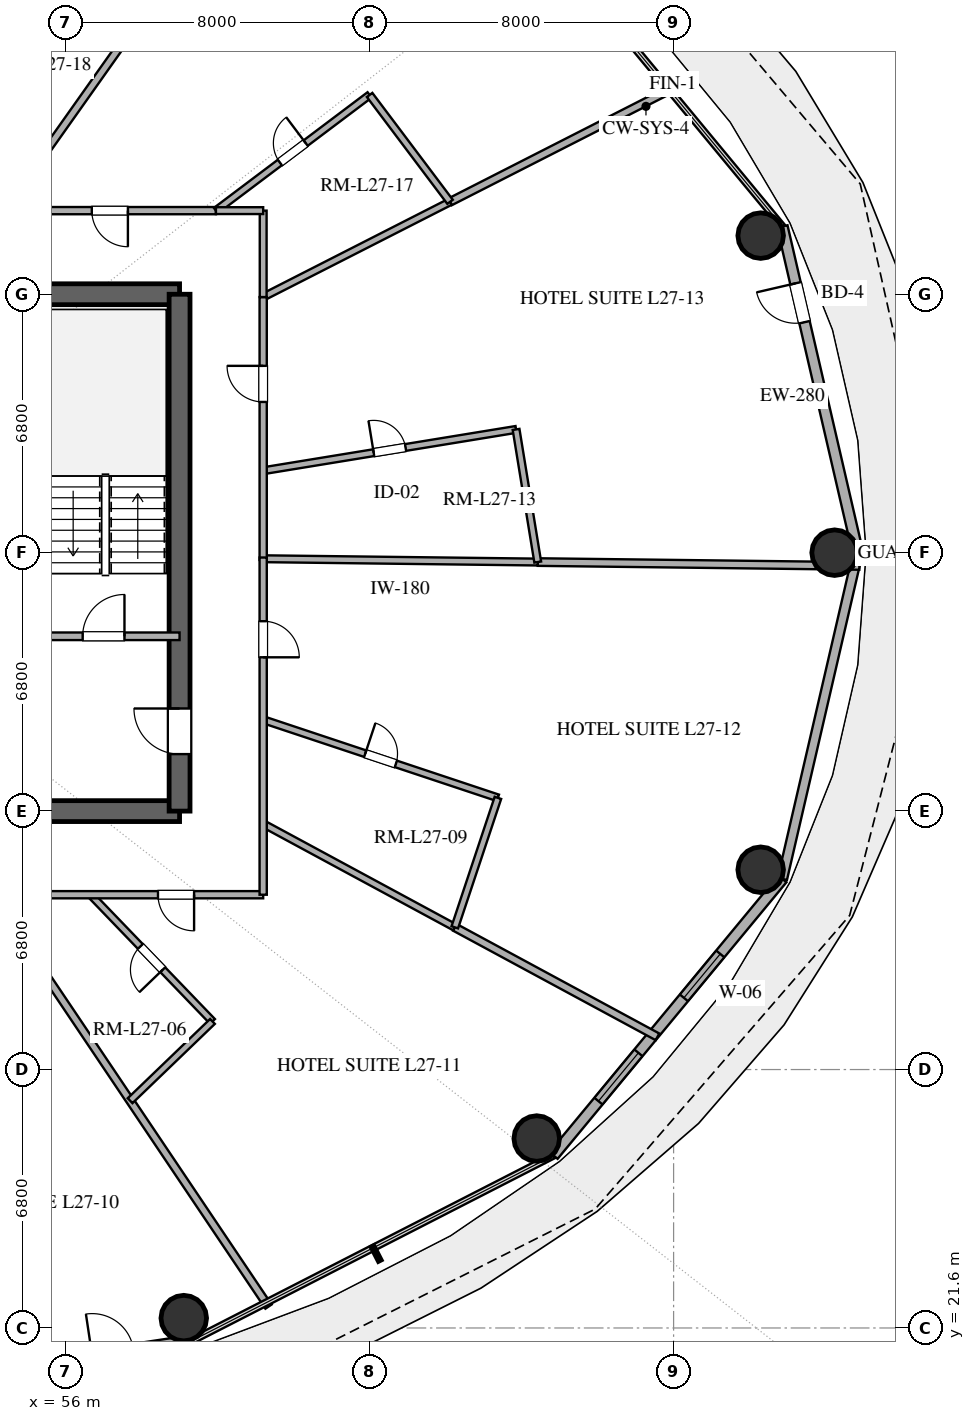
"""IFC4 building model, lengths in metres.
Left out: names, types, materials, properties, quantities, classifications, styles, units other than length and angle.
Written with IfcOpenShell. Run it as: python <this file> out.ifc"""

import sys

from ifc_helpers import new_model, si_unit, direction, frame, frame_2d, origin, origin_2d, place, context, subcontext, project, spatial, rectangle, hollow_circle, extrude, element, fill, save


model = new_model("IFC4")
c1 = context("Model", 3, precision=1e-05, world=origin(), true_north=direction((0.0, 1.0)))
c2 = subcontext(c1, "Body", "Model", "MODEL_VIEW")
j1 = project(units=[si_unit("LENGTHUNIT", "METRE"), si_unit("PLANEANGLEUNIT", "RADIAN")], contexts=[c1])
p1 = place(None, origin())
s1 = spatial("IfcSite", under=j1, at=p1, CompositionType="ELEMENT")
p2 = place(p1, origin())
s2 = spatial("IfcBuilding", under=s1, at=p2, CompositionType="ELEMENT")
p3 = place(p2, frame((0.0, 0.0, 109.2)))
s3 = spatial("IfcBuildingStorey", under=s2, at=p3, CompositionType="ELEMENT", Elevation=109.2)
for number, where, z_axis, x_axis in (
    (1, (55.0, 35.2, 0.0), (0.0, 0.0, 1.0), (1.0, 0.0, 0.0)),
    (2, (55.0, 48.8, 0.0), (0.0, 0.0, 1.0), (1.0, 0.0, 0.0)),
):
    element("IfcWall", number, at=place(p3, frame(where, z_axis=z_axis, x_axis=x_axis)), inside=s3, PredefinedType="SHEAR", context=c2, shape_type="SweptSolid", body=[
        extrude(rectangle(XDim=4.0, YDim=0.55, at=frame_2d((2.0, 0.0))), origin(), (0.0, 0.0, 1.0), 3.38),
    ])
p4 = place(p3, frame((59.0, 35.2, 0.0), z_axis=(0.0, 0.0, 1.0), x_axis=(0.0, 1.0, 0.0)))
e3 = element("IfcWall", 3, at=p4, inside=s3, PredefinedType="SHEAR", context=c2, shape_type="SweptSolid", body=[
    extrude(rectangle(XDim=13.6, YDim=0.55, at=frame_2d((6.8, 0.0))), origin(), (0.0, 0.0, 1.0), 3.38),
])
p5 = place(p4, frame((1.5, 0.0, 0.0)))
e4 = element("IfcOpeningElement", 4, at=p5, cuts=e3, PredefinedType="OPENING", context=c2, shape_type="SweptSolid", body=[
    extrude(rectangle(XDim=1.2, YDim=2.15, at=frame_2d((0.6, 1.075))), frame((0.0, 0.285, 0.0), z_axis=(0.0, -1.0, 0.0), x_axis=(1.0, 0.0, 0.0)), (0.0, 0.0, 1.0), 0.57),
])
for number, where, z_axis, x_axis in (
    (5, (76.237, 42.0, 0.0), (0.0, 0.0, 1.0), (1.0, 0.0, 0.0)),
    (6, (74.291, 50.343, 0.0), (0.0, 0.0, 1.0), (1.0, 0.0, 0.0)),
    (7, (59.11, 21.859, 0.0), (0.0, 0.0, 1.0), (1.0, 0.0, 0.0)),
    (8, (68.398, 26.585, 0.0), (0.0, 0.0, 1.0), (1.0, 0.0, 0.0)),
    (9, (74.291, 33.657, 0.0), (0.0, 0.0, 1.0), (1.0, 0.0, 0.0)),
):
    element("IfcColumn", number, at=place(p3, frame(where, z_axis=z_axis, x_axis=x_axis)), inside=s3, PredefinedType="COLUMN", context=c2, shape_type="SweptSolid", body=[
        extrude(hollow_circle(Radius=0.6, WallThickness=0.032, at=origin_2d()), origin(), (0.0, 0.0, 1.0), 3.38),
    ])
p6 = place(p3, frame((76.849, 42.0, 0.0), z_axis=(0.0, 0.0, 1.0), x_axis=(-0.22558597182, 0.974223264616, 0.0)))
e10 = element("IfcWall", 10, at=p6, inside=s3, PredefinedType="SOLIDWALL", context=c2, shape_type="SweptSolid", body=[
    extrude(rectangle(XDim=8.811, YDim=0.28, at=frame_2d((4.405, 0.0))), origin(), (0.0, 0.0, 1.0), 3.38),
])
p7 = place(p6, frame((6.225, 0.0, 0.0)))
e11 = element("IfcOpeningElement", 11, at=p7, cuts=e10, PredefinedType="OPENING", context=c2, shape_type="SweptSolid", body=[
    extrude(rectangle(XDim=1.05, YDim=2.2, at=frame_2d((0.525, 1.1))), frame((0.0, 0.15, 0.0), z_axis=(0.0, -1.0, 0.0), x_axis=(1.0, 0.0, 0.0)), (0.0, 0.0, 1.0), 0.3),
])
p8 = place(p3, frame((48.0, 19.57, 0.0), z_axis=(0.0, 0.0, 1.0), x_axis=(0.988877774656, 0.148730450117, 0.0)))
e12 = element("IfcWall", 12, at=p8, inside=s3, PredefinedType="SOLIDWALL", context=c2, shape_type="SweptSolid", body=[
    extrude(rectangle(XDim=11.479, YDim=0.28, at=frame_2d((5.74, 0.0))), origin(), (0.0, 0.0, 1.0), 3.38),
])
p9 = place(p8, frame((8.797, 0.0, 0.0)))
e13 = element("IfcOpeningElement", 13, at=p9, cuts=e12, PredefinedType="OPENING", context=c2, shape_type="SweptSolid", body=[
    extrude(rectangle(XDim=1.1, YDim=2.25, at=frame_2d((0.55, 1.125))), frame((0.0, 0.15, 0.0), z_axis=(0.0, -1.0, 0.0), x_axis=(1.0, 0.0, 0.0)), (0.0, 0.0, 1.0), 0.3),
])
p10 = place(p3, frame((68.84, 26.14, 0.0), z_axis=(0.0, 0.0, 1.0), x_axis=(0.637505817448, 0.770445541696, 0.0)))
e14 = element("IfcWall", 14, at=p10, inside=s3, PredefinedType="SOLIDWALL", context=c2, shape_type="SweptSolid", body=[
    extrude(rectangle(XDim=9.445, YDim=0.28, at=frame_2d((4.723, 0.0))), origin(), (0.0, 0.0, 1.0), 3.38),
])
p11 = place(p10, frame((1.855, 0.0, 0.85)))
e15 = element("IfcOpeningElement", 15, at=p11, cuts=e14, PredefinedType="OPENING", context=c2, shape_type="SweptSolid", body=[
    extrude(rectangle(XDim=1.65, YDim=2.0, at=frame_2d((0.825, 1.0))), frame((0.0, 0.15, 0.0), z_axis=(0.0, -1.0, 0.0), x_axis=(1.0, 0.0, 0.0)), (0.0, 0.0, 1.0), 0.3),
])
p12 = place(p10, frame((5.383, 0.0, 0.85)))
e16 = element("IfcOpeningElement", 16, at=p12, cuts=e14, PredefinedType="OPENING", context=c2, shape_type="SweptSolid", body=[
    extrude(rectangle(XDim=1.5, YDim=2.0, at=frame_2d((0.75, 1.0))), frame((0.0, 0.15, 0.0), z_axis=(0.0, -1.0, 0.0), x_axis=(1.0, 0.0, 0.0)), (0.0, 0.0, 1.0), 0.3),
])
p13 = place(p3, frame((74.861, 33.417, 0.0), z_axis=(0.0, 0.0, 1.0), x_axis=(0.22558597182, 0.974223264616, 0.0)))
e17 = element("IfcWall", 17, at=p13, inside=s3, PredefinedType="SOLIDWALL", context=c2, shape_type="SweptSolid", body=[
    extrude(rectangle(XDim=8.811, YDim=0.25, at=frame_2d((4.405, 0.0))), origin(), (0.0, 0.0, 1.0), 3.38),
])
p14 = place(p3, frame((55.0, 39.8, 0.0), z_axis=(0.0, 0.0, 1.0), x_axis=(1.0, 0.0, 0.0)))
e18 = element("IfcWall", 18, at=p14, inside=s3, PredefinedType="SOLIDWALL", context=c2, shape_type="SweptSolid", body=[
    extrude(rectangle(XDim=4.0, YDim=0.2, at=frame_2d((2.0, 0.0))), origin(), (0.0, 0.0, 1.0), 2.74),
])
p15 = place(p14, frame((1.45, 0.0, 0.0)))
e19 = element("IfcOpeningElement", 19, at=p15, cuts=e18, PredefinedType="OPENING", context=c2, shape_type="SweptSolid", body=[
    extrude(rectangle(XDim=1.1, YDim=2.15, at=frame_2d((0.55, 1.075))), frame((0.0, 0.11, 0.0), z_axis=(0.0, -1.0, 0.0), x_axis=(1.0, 0.0, 0.0)), (0.0, 0.0, 1.0), 0.22),
])
p16 = place(p3, frame((76.888, 41.651, 0.0), z_axis=(0.0, 0.0, 1.0), x_axis=(-0.9999269672, 0.012085539541, 0.0)))
e20 = element("IfcWall", 20, at=p16, inside=s3, PredefinedType="PARTITIONING", context=c2, shape_type="SweptSolid", body=[
    extrude(rectangle(XDim=8.464, YDim=0.2, at=frame_2d((4.232, 0.0))), origin(), (0.0, 0.0, 1.0), 2.74),
])
p17 = place(p3, frame((54.374, 51.0, 0.0), z_axis=(0.0, 0.0, 1.0), x_axis=(0.577967135411, 0.816060040919, 0.0)))
e21 = element("IfcWall", 21, at=p17, inside=s3, PredefinedType="PARTITIONING", context=c2, shape_type="SweptSolid", body=[
    extrude(rectangle(XDim=12.953, YDim=0.2, at=frame_2d((6.477, 0.0))), origin(), (0.0, 0.0, 1.0), 2.74),
])
p18 = place(p3, frame((68.425, 41.753, 0.0), z_axis=(0.0, 0.0, 1.0), x_axis=(-0.999926833816, 0.012096570355, 0.0)))
e22 = element("IfcWall", 22, at=p18, inside=s3, PredefinedType="PLUMBINGWALL", context=c2, shape_type="SweptSolid", body=[
    extrude(rectangle(XDim=7.225, YDim=0.18, at=frame_2d((3.613, 0.0))), origin(), (0.0, 0.0, 1.0), 2.74),
])
p19 = place(p3, frame((61.2, 44.156, 0.0), z_axis=(0.0, 0.0, 1.0), x_axis=(0.986917247844, 0.161227621419, 0.0)))
e23 = element("IfcWall", 23, at=p19, inside=s3, PredefinedType="PLUMBINGWALL", context=c2, shape_type="SweptSolid", body=[
    extrude(rectangle(XDim=6.743, YDim=0.18, at=frame_2d((3.372, 0.0))), origin(), (0.0, 0.0, 1.0), 2.74),
])
p20 = place(p19, frame((2.946, 0.0, 0.0)))
e24 = element("IfcOpeningElement", 24, at=p20, cuts=e23, PredefinedType="OPENING", context=c2, shape_type="SweptSolid", body=[
    extrude(rectangle(XDim=0.85, YDim=2.1, at=frame_2d((0.425, 1.05))), frame((0.0, 0.1, 0.0), z_axis=(0.0, -1.0, 0.0), x_axis=(1.0, 0.0, 0.0)), (0.0, 0.0, 1.0), 0.2),
])
p21 = place(p3, frame((71.998, 54.228, 0.0), z_axis=(0.0, 0.0, 1.0), x_axis=(-0.891005333778, -0.453992836044, 0.0)))
e25 = element("IfcWall", 25, at=p21, inside=s3, PredefinedType="PARTITIONING", context=c2, shape_type="SweptSolid", body=[
    extrude(rectangle(XDim=6.599, YDim=0.2, at=frame_2d((3.3, 0.0))), origin(), (0.0, 0.0, 1.0), 2.74),
])
p22 = place(p3, frame((54.053, 33.0, 0.0), z_axis=(0.0, 0.0, 1.0), x_axis=(0.558073496329, -0.829791523634, 0.0)))
e26 = element("IfcWall", 26, at=p22, inside=s3, PredefinedType="PARTITIONING", context=c2, shape_type="SweptSolid", body=[
    extrude(rectangle(XDim=13.06, YDim=0.2, at=frame_2d((6.53, 0.0))), origin(), (0.0, 0.0, 1.0), 2.74),
])
p23 = place(p3, frame((61.2, 37.605, 0.0), z_axis=(0.0, 0.0, 1.0), x_axis=(0.948788249983, -0.315912735884, 0.0)))
e27 = element("IfcWall", 27, at=p23, inside=s3, PredefinedType="PLUMBINGWALL", context=c2, shape_type="SweptSolid", body=[
    extrude(rectangle(XDim=6.51, YDim=0.18, at=frame_2d((3.255, 0.0))), origin(), (0.0, 0.0, 1.0), 2.74),
])
p24 = place(p23, frame((2.83, 0.0, 0.0)))
e28 = element("IfcOpeningElement", 28, at=p24, cuts=e27, PredefinedType="OPENING", context=c2, shape_type="SweptSolid", body=[
    extrude(rectangle(XDim=0.85, YDim=2.1, at=frame_2d((0.425, 1.05))), frame((0.0, 0.1, 0.0), z_axis=(0.0, -1.0, 0.0), x_axis=(1.0, 0.0, 0.0)), (0.0, 0.0, 1.0), 0.2),
])
p25 = place(p3, frame((71.576, 29.261, 0.0), z_axis=(0.0, 0.0, 1.0), x_axis=(-0.879774354245, 0.475391507721, 0.0)))
e29 = element("IfcWall", 29, at=p25, inside=s3, PredefinedType="PARTITIONING", context=c2, shape_type="SweptSolid", body=[
    extrude(rectangle(XDim=6.062, YDim=0.2, at=frame_2d((3.031, 0.0))), origin(), (0.0, 0.0, 1.0), 2.74),
])
p26 = place(p3, frame((66.243, 32.143, 0.0), z_axis=(0.0, 0.0, 1.0), x_axis=(-0.879784992633, 0.475371819461, 0.0)))
e30 = element("IfcWall", 30, at=p26, inside=s3, PredefinedType="PLUMBINGWALL", context=c2, shape_type="SweptSolid", body=[
    extrude(rectangle(XDim=5.732, YDim=0.18, at=frame_2d((2.866, 0.0))), origin(), (0.0, 0.0, 1.0), 2.74),
])
p27 = place(p3, frame((59.957, 51.0, 0.0), z_axis=(0.0, 0.0, 1.0), x_axis=(-1.0, 0.0, 0.0)))
e31 = element("IfcWall", 31, at=p27, inside=s3, PredefinedType="PARTITIONING", context=c2, shape_type="SweptSolid", body=[
    extrude(rectangle(XDim=7.73, YDim=0.19, at=frame_2d((3.865, 0.0))), origin(), (0.0, 0.0, 1.0), 2.74),
])
p28 = place(p27, frame((2.316, 0.0, 0.0)))
e32 = element("IfcOpeningElement", 32, at=p28, cuts=e31, PredefinedType="OPENING", context=c2, shape_type="SweptSolid", body=[
    extrude(rectangle(XDim=0.95, YDim=2.15, at=frame_2d((0.475, 1.075))), frame((0.0, 0.105, 0.0), z_axis=(0.0, -1.0, 0.0), x_axis=(1.0, 0.0, 0.0)), (0.0, 0.0, 1.0), 0.21),
])
p29 = place(p3, frame((66.118, 51.231, 0.0), z_axis=(0.0, 0.0, 1.0), x_axis=(-0.891004388837, -0.453994690579, 0.0)))
e33 = element("IfcWall", 33, at=p29, inside=s3, PredefinedType="PLUMBINGWALL", context=c2, shape_type="SweptSolid", body=[
    extrude(rectangle(XDim=5.52, YDim=0.18, at=frame_2d((2.76, 0.0))), origin(), (0.0, 0.0, 1.0), 2.74),
])
p30 = place(p3, frame((59.957, 51.0, 0.0), z_axis=(0.0, 0.0, 1.0), x_axis=(0.798951197172, 0.601395863419, 0.0)))
e34 = element("IfcWall", 34, at=p30, inside=s3, PredefinedType="PLUMBINGWALL", context=c2, shape_type="SweptSolid", body=[
    extrude(rectangle(XDim=5.062, YDim=0.18, at=frame_2d((2.531, 0.0))), origin(), (0.0, 0.0, 1.0), 2.74),
])
p31 = place(p30, frame((2.106, 0.0, 0.0)))
e35 = element("IfcOpeningElement", 35, at=p31, cuts=e34, PredefinedType="OPENING", context=c2, shape_type="SweptSolid", body=[
    extrude(rectangle(XDim=0.85, YDim=2.1, at=frame_2d((0.425, 1.05))), frame((0.0, 0.1, 0.0), z_axis=(0.0, -1.0, 0.0), x_axis=(1.0, 0.0, 0.0)), (0.0, 0.0, 1.0), 0.2),
])
p32 = place(p3, frame((59.866, 29.666, 0.0), z_axis=(0.0, 0.0, 1.0), x_axis=(-0.693306956927, 0.720642396392, 0.0)))
e36 = element("IfcWall", 36, at=p32, inside=s3, PredefinedType="PLUMBINGWALL", context=c2, shape_type="SweptSolid", body=[
    extrude(rectangle(XDim=4.626, YDim=0.18, at=frame_2d((2.313, 0.0))), origin(), (0.0, 0.0, 1.0), 2.74),
])
p33 = place(p32, frame((1.888, 0.0, 0.0)))
e37 = element("IfcOpeningElement", 37, at=p33, cuts=e36, PredefinedType="OPENING", context=c2, shape_type="SweptSolid", body=[
    extrude(rectangle(XDim=0.85, YDim=2.1, at=frame_2d((0.425, 1.05))), frame((0.0, 0.1, 0.0), z_axis=(0.0, -1.0, 0.0), x_axis=(1.0, 0.0, 0.0)), (0.0, 0.0, 1.0), 0.2),
])
p34 = place(p3, frame((61.2, 33.0, 0.0), z_axis=(0.0, 0.0, 1.0), x_axis=(-1.0, 0.0, 0.0)))
e38 = element("IfcWall", 38, at=p34, inside=s3, PredefinedType="PARTITIONING", context=c2, shape_type="SweptSolid", body=[
    extrude(rectangle(XDim=7.186, YDim=0.19, at=frame_2d((3.593, 0.0))), origin(), (0.0, 0.0, 1.0), 2.74),
])
p35 = place(p34, frame((1.818, 0.0, 0.0)))
e39 = element("IfcOpeningElement", 39, at=p35, cuts=e38, PredefinedType="OPENING", context=c2, shape_type="SweptSolid", body=[
    extrude(rectangle(XDim=0.95, YDim=2.15, at=frame_2d((0.475, 1.075))), frame((0.0, 0.105, 0.0), z_axis=(0.0, -1.0, 0.0), x_axis=(1.0, 0.0, 0.0)), (0.0, 0.0, 1.0), 0.21),
])
p36 = place(p3, frame((61.2, 41.809, 0.0), z_axis=(0.0, 0.0, 1.0), x_axis=(0.0, 1.0, 0.0)))
e40 = element("IfcWall", 40, at=p36, inside=s3, PredefinedType="PARTITIONING", context=c2, shape_type="SweptSolid", body=[
    extrude(rectangle(XDim=6.917, YDim=0.19, at=frame_2d((3.458, 0.0))), origin(), (0.0, 0.0, 1.0), 2.74),
])
p37 = place(p36, frame((4.157, 0.0, 0.0)))
e41 = element("IfcOpeningElement", 41, at=p37, cuts=e40, PredefinedType="OPENING", context=c2, shape_type="SweptSolid", body=[
    extrude(rectangle(XDim=0.95, YDim=2.15, at=frame_2d((0.475, 1.075))), frame((0.0, 0.105, 0.0), z_axis=(0.0, -1.0, 0.0), x_axis=(1.0, 0.0, 0.0)), (0.0, 0.0, 1.0), 0.21),
])
p38 = place(p3, frame((61.2, 41.873, 0.0), z_axis=(0.0, 0.0, 1.0), x_axis=(0.0, -1.0, 0.0)))
e42 = element("IfcWall", 42, at=p38, inside=s3, PredefinedType="PARTITIONING", context=c2, shape_type="SweptSolid", body=[
    extrude(rectangle(XDim=8.873, YDim=0.19, at=frame_2d((4.436, 0.0))), origin(), (0.0, 0.0, 1.0), 2.74),
])
p39 = place(p38, frame((1.676, 0.0, 0.0)))
e43 = element("IfcOpeningElement", 43, at=p39, cuts=e42, PredefinedType="OPENING", context=c2, shape_type="SweptSolid", body=[
    extrude(rectangle(XDim=0.95, YDim=2.15, at=frame_2d((0.475, 1.075))), frame((0.0, 0.105, 0.0), z_axis=(0.0, -1.0, 0.0), x_axis=(1.0, 0.0, 0.0)), (0.0, 0.0, 1.0), 0.21),
])
p40 = place(p3, frame((67.377, 35.548, 0.0), z_axis=(0.0, 0.0, 1.0), x_axis=(-0.315860462711, -0.948805653491, 0.0)))
e44 = element("IfcWall", 44, at=p40, inside=s3, PredefinedType="PLUMBINGWALL", context=c2, shape_type="SweptSolid", body=[
    extrude(rectangle(XDim=3.59, YDim=0.18, at=frame_2d((1.795, 0.0))), origin(), (0.0, 0.0, 1.0), 2.74),
])
p41 = place(p3, frame((67.855, 45.243, 0.0), z_axis=(0.0, 0.0, 1.0), x_axis=(0.161207379819, -0.986920554397, 0.0)))
e45 = element("IfcWall", 45, at=p41, inside=s3, PredefinedType="PLUMBINGWALL", context=c2, shape_type="SweptSolid", body=[
    extrude(rectangle(XDim=3.536, YDim=0.18, at=frame_2d((1.768, 0.0))), origin(), (0.0, 0.0, 1.0), 2.74),
])
p42 = place(p3, frame((64.001, 54.044, 0.0), z_axis=(0.0, 0.0, 1.0), x_axis=(0.601341788725, -0.79899189804, 0.0)))
e46 = element("IfcWall", 46, at=p42, inside=s3, PredefinedType="PLUMBINGWALL", context=c2, shape_type="SweptSolid", body=[
    extrude(rectangle(XDim=3.52, YDim=0.18, at=frame_2d((1.76, 0.0))), origin(), (0.0, 0.0, 1.0), 2.74),
])
p43 = place(p3, frame((57.698, 27.58, 0.0), z_axis=(0.0, 0.0, 1.0), x_axis=(0.720688028056, 0.693259522991, 0.0)))
e47 = element("IfcWall", 47, at=p43, inside=s3, PredefinedType="PLUMBINGWALL", context=c2, shape_type="SweptSolid", body=[
    extrude(rectangle(XDim=3.009, YDim=0.18, at=frame_2d((1.504, 0.0))), origin(), (0.0, 0.0, 1.0), 2.74),
])
p44 = place(p3, frame((61.2, 48.726, 0.0), z_axis=(0.0, 0.0, 1.0), x_axis=(0.0, 1.0, 0.0)))
e48 = element("IfcWall", 48, at=p44, inside=s3, PredefinedType="PLUMBINGWALL", context=c2, shape_type="SweptSolid", body=[
    extrude(rectangle(XDim=2.274, YDim=0.18, at=frame_2d((1.137, 0.0))), origin(), (0.0, 0.0, 1.0), 2.74),
])
p45 = place(p3, frame((61.2, 51.0, 0.0), z_axis=(0.0, 0.0, 1.0), x_axis=(-1.0, 0.0, 0.0)))
e49 = element("IfcWall", 49, at=p45, inside=s3, PredefinedType="PLUMBINGWALL", context=c2, shape_type="SweptSolid", body=[
    extrude(rectangle(XDim=1.243, YDim=0.18, at=frame_2d((0.622, 0.0))), origin(), (0.0, 0.0, 1.0), 2.74),
])
p46 = place(p7, origin())
e50 = element("IfcDoor", 50, at=p46, inside=s3, OperationType="SINGLE_SWING_RIGHT", PredefinedType="DOOR", context=c2, shape_type="SweptSolid", body=[
    extrude(rectangle(XDim=1.05, YDim=2.2, at=frame_2d((0.525, 1.1))), frame((0.0, 0.025, 0.0), z_axis=(0.0, -1.0, 0.0), x_axis=(1.0, 0.0, 0.0)), (0.0, 0.0, 1.0), 0.05),
])
fill(e11, e50)
p47 = place(p11, origin())
e51 = element("IfcWindow", 51, at=p47, inside=s3, PartitioningType="SINGLE_PANEL", PredefinedType="WINDOW", context=c2, shape_type="SweptSolid", body=[
    extrude(rectangle(XDim=1.65, YDim=2.0, at=frame_2d((0.825, 1.0))), frame((0.0, 0.03, 0.0), z_axis=(0.0, -1.0, 0.0), x_axis=(1.0, 0.0, 0.0)), (0.0, 0.0, 1.0), 0.06),
])
fill(e15, e51)
p48 = place(p12, origin())
e52 = element("IfcWindow", 52, at=p48, inside=s3, PartitioningType="SINGLE_PANEL", PredefinedType="WINDOW", context=c2, shape_type="SweptSolid", body=[
    extrude(rectangle(XDim=1.5, YDim=2.0, at=frame_2d((0.75, 1.0))), frame((0.0, 0.03, 0.0), z_axis=(0.0, -1.0, 0.0), x_axis=(1.0, 0.0, 0.0)), (0.0, 0.0, 1.0), 0.06),
])
fill(e16, e52)
p49 = place(p5, origin())
e53 = element("IfcDoor", 53, at=p49, inside=s3, OperationType="SINGLE_SWING_RIGHT", PredefinedType="DOOR", context=c2, shape_type="SweptSolid", body=[
    extrude(rectangle(XDim=1.2, YDim=2.15, at=frame_2d((0.6, 1.075))), frame((0.0, 0.025, 0.0), z_axis=(0.0, -1.0, 0.0), x_axis=(1.0, 0.0, 0.0)), (0.0, 0.0, 1.0), 0.05),
])
fill(e4, e53)
p50 = place(p15, origin())
e54 = element("IfcDoor", 54, at=p50, inside=s3, OperationType="SINGLE_SWING_RIGHT", PredefinedType="DOOR", context=c2, shape_type="SweptSolid", body=[
    extrude(rectangle(XDim=1.1, YDim=2.15, at=frame_2d((0.55, 1.075))), frame((0.0, 0.025, 0.0), z_axis=(0.0, -1.0, 0.0), x_axis=(1.0, 0.0, 0.0)), (0.0, 0.0, 1.0), 0.05),
])
fill(e19, e54)
p51 = place(p20, origin())
e55 = element("IfcDoor", 55, at=p51, inside=s3, OperationType="SINGLE_SWING_LEFT", PredefinedType="DOOR", context=c2, shape_type="SweptSolid", body=[
    extrude(rectangle(XDim=0.85, YDim=2.1, at=frame_2d((0.425, 1.05))), frame((0.0, 0.025, 0.0), z_axis=(0.0, -1.0, 0.0), x_axis=(1.0, 0.0, 0.0)), (0.0, 0.0, 1.0), 0.05),
])
fill(e24, e55)
p52 = place(p24, origin())
e56 = element("IfcDoor", 56, at=p52, inside=s3, OperationType="SINGLE_SWING_LEFT", PredefinedType="DOOR", context=c2, shape_type="SweptSolid", body=[
    extrude(rectangle(XDim=0.85, YDim=2.1, at=frame_2d((0.425, 1.05))), frame((0.0, 0.025, 0.0), z_axis=(0.0, -1.0, 0.0), x_axis=(1.0, 0.0, 0.0)), (0.0, 0.0, 1.0), 0.05),
])
fill(e28, e56)
p53 = place(p28, origin())
e57 = element("IfcDoor", 57, at=p53, inside=s3, OperationType="SINGLE_SWING_LEFT", PredefinedType="DOOR", context=c2, shape_type="SweptSolid", body=[
    extrude(rectangle(XDim=0.95, YDim=2.15, at=frame_2d((0.475, 1.075))), frame((0.0, 0.025, 0.0), z_axis=(0.0, -1.0, 0.0), x_axis=(1.0, 0.0, 0.0)), (0.0, 0.0, 1.0), 0.05),
])
fill(e32, e57)
p54 = place(p31, origin())
e58 = element("IfcDoor", 58, at=p54, inside=s3, OperationType="SINGLE_SWING_RIGHT", PredefinedType="DOOR", context=c2, shape_type="SweptSolid", body=[
    extrude(rectangle(XDim=0.85, YDim=2.1, at=frame_2d((0.425, 1.05))), frame((0.0, 0.025, 0.0), z_axis=(0.0, -1.0, 0.0), x_axis=(1.0, 0.0, 0.0)), (0.0, 0.0, 1.0), 0.05),
])
fill(e35, e58)
p55 = place(p33, origin())
e59 = element("IfcDoor", 59, at=p55, inside=s3, OperationType="SINGLE_SWING_LEFT", PredefinedType="DOOR", context=c2, shape_type="SweptSolid", body=[
    extrude(rectangle(XDim=0.85, YDim=2.1, at=frame_2d((0.425, 1.05))), frame((0.0, 0.025, 0.0), z_axis=(0.0, -1.0, 0.0), x_axis=(1.0, 0.0, 0.0)), (0.0, 0.0, 1.0), 0.05),
])
fill(e37, e59)
p56 = place(p35, origin())
e60 = element("IfcDoor", 60, at=p56, inside=s3, OperationType="SINGLE_SWING_LEFT", PredefinedType="DOOR", context=c2, shape_type="SweptSolid", body=[
    extrude(rectangle(XDim=0.95, YDim=2.15, at=frame_2d((0.475, 1.075))), frame((0.0, 0.025, 0.0), z_axis=(0.0, -1.0, 0.0), x_axis=(1.0, 0.0, 0.0)), (0.0, 0.0, 1.0), 0.05),
])
fill(e39, e60)
p57 = place(p37, origin())
e61 = element("IfcDoor", 61, at=p57, inside=s3, OperationType="SINGLE_SWING_RIGHT", PredefinedType="DOOR", context=c2, shape_type="SweptSolid", body=[
    extrude(rectangle(XDim=0.95, YDim=2.15, at=frame_2d((0.475, 1.075))), frame((0.0, 0.025, 0.0), z_axis=(0.0, -1.0, 0.0), x_axis=(1.0, 0.0, 0.0)), (0.0, 0.0, 1.0), 0.05),
])
fill(e41, e61)
p58 = place(p39, origin())
e62 = element("IfcDoor", 62, at=p58, inside=s3, OperationType="SINGLE_SWING_RIGHT", PredefinedType="DOOR", context=c2, shape_type="SweptSolid", body=[
    extrude(rectangle(XDim=0.95, YDim=2.15, at=frame_2d((0.475, 1.075))), frame((0.0, 0.025, 0.0), z_axis=(0.0, -1.0, 0.0), x_axis=(1.0, 0.0, 0.0)), (0.0, 0.0, 1.0), 0.05),
])
fill(e43, e62)
save(model, sys.argv[1])
